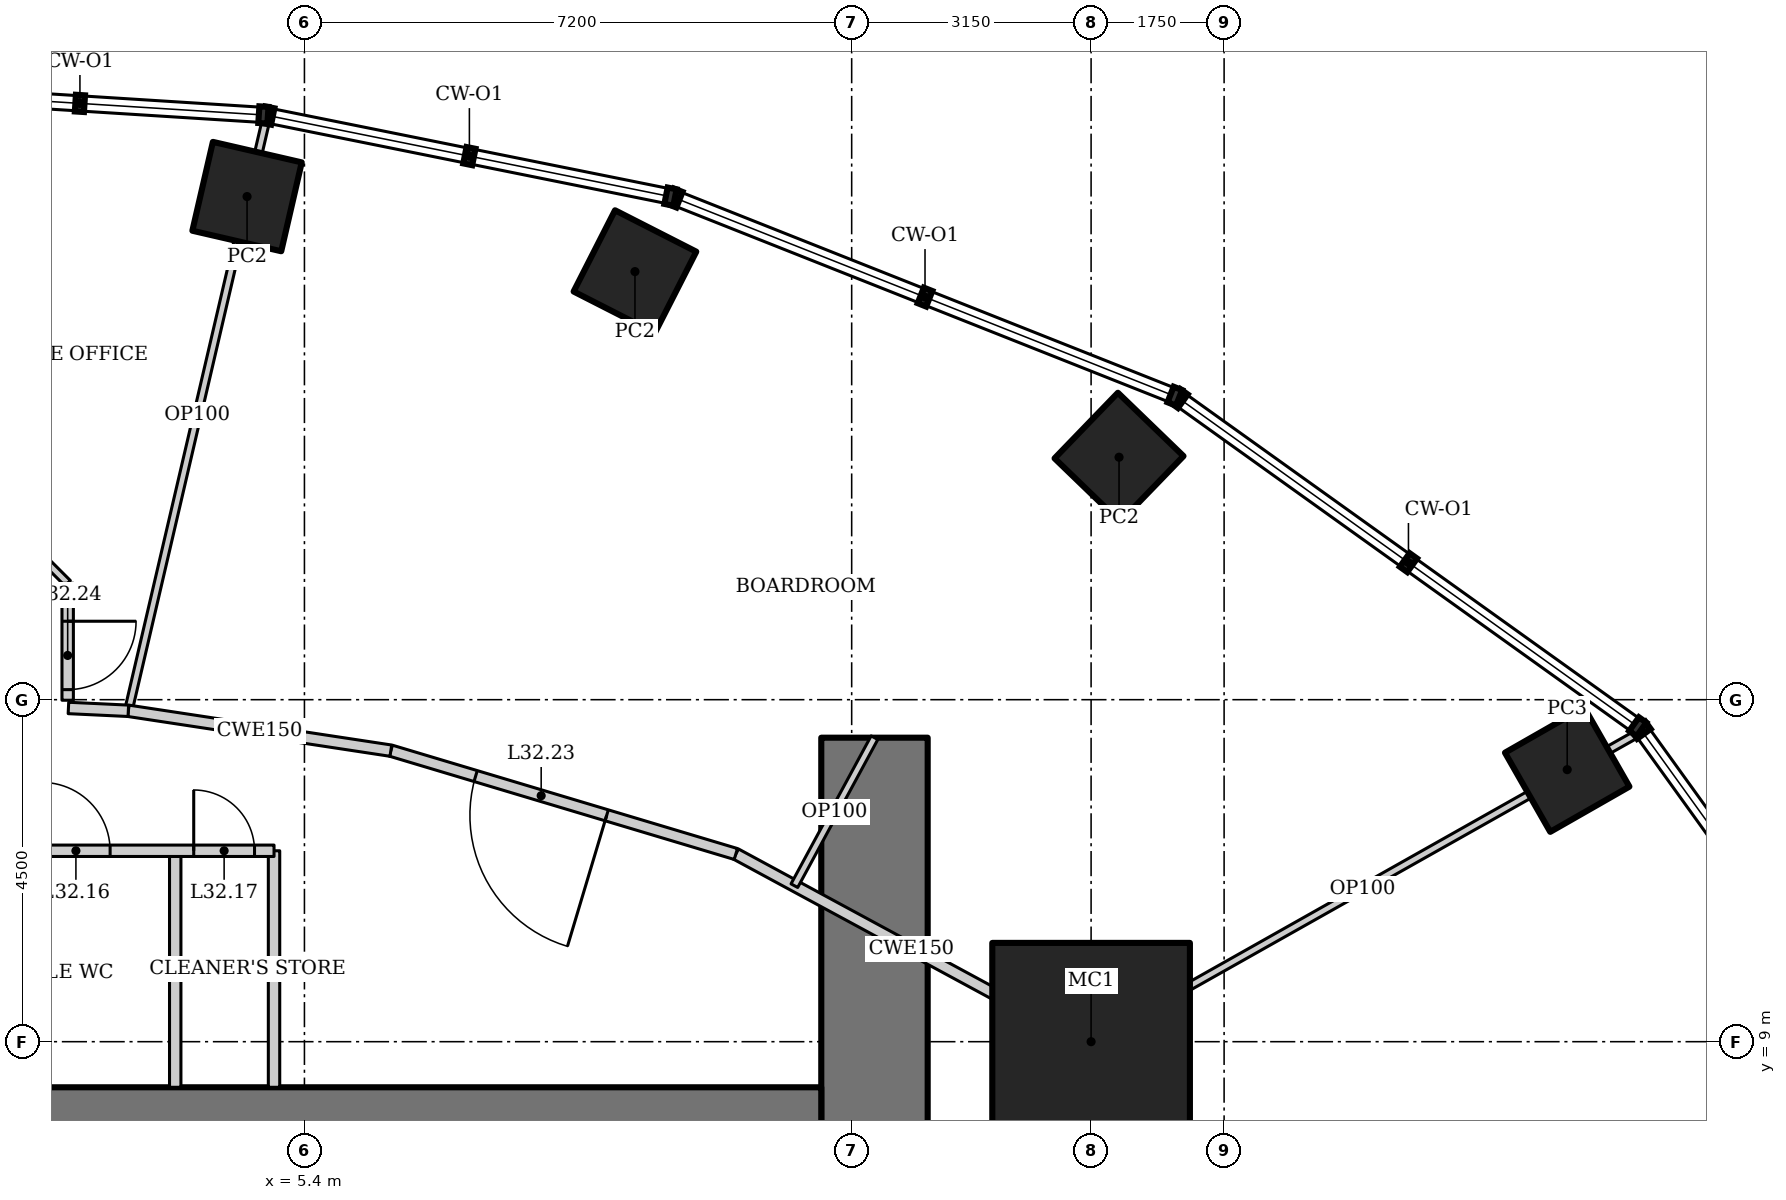
"""IFC4 building model, lengths in metres.
Left out: names, types, materials, properties, quantities, classifications, styles, units other than length and angle.
Written with IfcOpenShell. Run it as: python <this file> out.ifc"""

import sys

from ifc_helpers import new_model, si_unit, direction, frame, frame_2d, origin, origin_2d, place, context, subcontext, project, spatial, rectangle, hollow_rectangle, extrude, element, fill, save


model = new_model("IFC4")
c1 = context("Model", 3, precision=1e-05, world=origin(), true_north=direction((0.0, 1.0)))
c2 = subcontext(c1, "Body", "Model", "MODEL_VIEW")
j1 = project(units=[si_unit("LENGTHUNIT", "METRE"), si_unit("PLANEANGLEUNIT", "RADIAN")], contexts=[c1])
p1 = place(None, origin())
s1 = spatial("IfcSite", under=j1, at=p1, CompositionType="ELEMENT")
p2 = place(p1, origin())
s2 = spatial("IfcBuilding", under=s1, at=p2, CompositionType="ELEMENT")
p3 = place(p2, frame((0.0, 0.0, 138.4)))
s3 = spatial("IfcBuildingStorey", under=s2, at=p3, CompositionType="ELEMENT", Elevation=138.4)
p4 = place(p3, frame((15.75, 9.0, 0.0), z_axis=(0.0, 0.0, 1.0), x_axis=(1.0, 0.0, 0.0)))
e1 = element("IfcColumn", 1, at=p4, inside=s3, PredefinedType="COLUMN", context=c2, shape_type="SweptSolid", body=[
    extrude(hollow_rectangle(XDim=2.6, YDim=2.6, WallThickness=0.13, at=origin_2d()), origin(), (0.0, 0.0, 1.0), 4.2),
])
p5 = place(p3, frame((22.014, 12.579, 0.0), z_axis=(0.0, 0.0, 1.0), x_axis=(0.86824298017, 0.496139221777, 0.0)))
e2 = element("IfcColumn", 2, at=p5, inside=s3, PredefinedType="COLUMN", context=c2, shape_type="SweptSolid", body=[
    extrude(hollow_rectangle(XDim=1.2, YDim=1.2, WallThickness=0.12, at=origin_2d()), origin(), (0.0, 0.0, 1.0), 4.2),
])
for number, where, z_axis, x_axis in (
    (3, (16.118, 16.69, 0.0), (0.0, 0.0, 1.0), (0.695, 0.719, 0.0)),
    (4, (9.749, 19.133, 0.0), (0.0, 0.0, 1.0), (0.454, 0.891, 0.0)),
    (5, (4.645, 20.12, 0.0), (0.0, 0.0, 1.0), (0.225, 0.974, 0.0)),
):
    element("IfcColumn", number, at=place(p3, frame(where, z_axis=z_axis, x_axis=x_axis)), inside=s3, PredefinedType="COLUMN", context=c2, shape_type="SweptSolid", body=[
        extrude(hollow_rectangle(XDim=1.2, YDim=1.2, WallThickness=0.1, at=origin_2d()), origin(), (0.0, 0.0, 1.0), 4.2),
    ])
p6 = place(p3, frame((12.9, -13.0, 0.0), z_axis=(0.0, 0.0, 1.0), x_axis=(0.0, 1.0, 0.0)))
e6 = element("IfcWall", 6, at=p6, inside=s3, PredefinedType="SHEAR", context=c2, shape_type="SweptSolid", body=[
    extrude(rectangle(XDim=26.0, YDim=1.4, at=frame_2d((13.0, 0.0))), origin(), (0.0, 0.0, 1.0), 4.2),
])
p7 = place(p6, frame((12.1, 0.0, 0.0)))
e7 = element("IfcOpeningElement", 7, at=p7, cuts=e6, PredefinedType="OPENING", context=c2, shape_type="SweptSolid", body=[
    extrude(rectangle(XDim=1.8, YDim=2.1, at=frame_2d((0.9, 1.05))), frame((0.0, 0.71, 0.0), z_axis=(0.0, -1.0, 0.0), x_axis=(1.0, 0.0, 0.0)), (0.0, 0.0, 1.0), 1.42),
])
p8 = place(p3, frame((12.2, 7.6, 0.0), z_axis=(0.0, 0.0, 1.0), x_axis=(-1.0, 0.0, 0.0)))
e8 = element("IfcWall", 8, at=p8, inside=s3, PredefinedType="SHEAR", context=c2, shape_type="SweptSolid", body=[
    extrude(rectangle(XDim=24.4, YDim=1.6, at=frame_2d((12.2, 0.0))), origin(), (0.0, 0.0, 1.0), 4.2),
])
p9 = place(p3, frame((22.949, 13.059, 0.0), z_axis=(0.0, 0.0, 1.0), x_axis=(-0.871079462611, -0.491142107558, 0.0)))
e9 = element("IfcWall", 9, at=p9, inside=s3, PredefinedType="PARTITIONING", context=c2, shape_type="SweptSolid", body=[
    extrude(rectangle(XDim=8.327, YDim=0.1, at=frame_2d((4.164, 0.0))), origin(), (0.0, 0.0, 1.0), 3.451),
])
p10 = place(p3, frame((4.897, 21.135, 0.0), z_axis=(0.0, 0.0, 1.0), x_axis=(-0.227039313577, -0.973885593943, 0.0)))
e10 = element("IfcWall", 10, at=p10, inside=s3, PredefinedType="PARTITIONING", context=c2, shape_type="SweptSolid", body=[
    extrude(rectangle(XDim=7.99, YDim=0.1, at=frame_2d((3.995, 0.0))), origin(), (0.0, 0.0, 1.0), 3.293),
])
p11 = place(p3, frame((19.579, 4.882, 0.0), z_axis=(0.0, 0.0, 1.0), x_axis=(-0.688797257101, 0.72495402517, 0.0)))
e11 = element("IfcWall", 11, at=p11, inside=s3, PredefinedType="PARTITIONING", context=c2, shape_type="SweptSolid", body=[
    extrude(rectangle(XDim=5.638, YDim=0.15, at=frame_2d((2.819, 0.0))), origin(), (0.0, 0.0, 1.0), 4.05),
])
p12 = place(p11, frame((0.15, 0.0, 0.0)))
e12 = element("IfcOpeningElement", 12, at=p12, cuts=e11, PredefinedType="OPENING", context=c2, shape_type="SweptSolid", body=[
    extrude(rectangle(XDim=0.9, YDim=2.1, at=frame_2d((0.45, 1.05))), frame((0.0, 0.085, 0.0), z_axis=(0.0, -1.0, 0.0), x_axis=(1.0, 0.0, 0.0)), (0.0, 0.0, 1.0), 0.17),
])
p13 = place(p3, frame((15.696, 8.969, 0.0), z_axis=(0.0, 0.0, 1.0), x_axis=(-0.879436285334, 0.476016617397, 0.0)))
e13 = element("IfcWall", 13, at=p13, inside=s3, PredefinedType="PARTITIONING", context=c2, shape_type="SweptSolid", body=[
    extrude(rectangle(XDim=5.253, YDim=0.15, at=frame_2d((2.626, 0.0))), origin(), (0.0, 0.0, 1.0), 4.05),
])
p14 = place(p3, frame((11.076, 11.469, 0.0), z_axis=(0.0, 0.0, 1.0), x_axis=(-0.957933992798, 0.286988615527, 0.0)))
e14 = element("IfcWall", 14, at=p14, inside=s3, PredefinedType="PARTITIONING", context=c2, shape_type="SweptSolid", body=[
    extrude(rectangle(XDim=4.738, YDim=0.15, at=frame_2d((2.369, 0.0))), origin(), (0.0, 0.0, 1.0), 4.05),
])
p15 = place(p14, frame((1.774, 0.0, 0.0)))
e15 = element("IfcOpeningElement", 15, at=p15, cuts=e14, PredefinedType="OPENING", context=c2, shape_type="SweptSolid", body=[
    extrude(rectangle(XDim=1.8, YDim=2.1, at=frame_2d((0.9, 1.05))), frame((0.0, 0.085, 0.0), z_axis=(0.0, -1.0, 0.0), x_axis=(1.0, 0.0, 0.0)), (0.0, 0.0, 1.0), 0.17),
])
p16 = place(p3, frame((6.537, 12.829, 0.0), z_axis=(0.0, 0.0, 1.0), x_axis=(-0.988668719464, 0.150113833987, 0.0)))
e16 = element("IfcWall", 16, at=p16, inside=s3, PredefinedType="PARTITIONING", context=c2, shape_type="SweptSolid", body=[
    extrude(rectangle(XDim=3.493, YDim=0.15, at=frame_2d((1.747, 0.0))), origin(), (0.0, 0.0, 1.0), 4.05),
])
for number, where, z_axis, x_axis in (
    (17, (5.0, 8.4, 0.0), (0.0, 0.0, 1.0), (0.0, 1.0, 0.0)),
    (18, (3.7, 8.4, 0.0), (0.0, 0.0, 1.0), (0.0, 1.0, 0.0)),
):
    element("IfcWall", number, at=place(p3, frame(where, z_axis=z_axis, x_axis=x_axis)), inside=s3, PredefinedType="SOLIDWALL", context=c2, shape_type="SweptSolid", body=[
        extrude(rectangle(XDim=3.112, YDim=0.15, at=frame_2d((1.556, 0.0))), origin(), (0.0, 0.0, 1.0), 4.05),
    ])
p17 = place(p3, frame((12.9, 13.0, 0.0), z_axis=(0.0, 0.0, 1.0), x_axis=(-0.475998959765, -0.879445842734, 0.0)))
e19 = element("IfcWall", 19, at=p17, inside=s3, PredefinedType="PARTITIONING", context=c2, shape_type="SweptSolid", body=[
    extrude(rectangle(XDim=2.214, YDim=0.1, at=frame_2d((1.107, 0.0))), origin(), (0.0, 0.0, 1.0), 4.05),
])
p18 = place(p3, frame((3.083, 13.354, 0.0), z_axis=(0.0, 0.0, 1.0), x_axis=(-0.998878614804, 0.04734461836, 0.0)))
e20 = element("IfcWall", 20, at=p18, inside=s3, PredefinedType="PARTITIONING", context=c2, shape_type="SweptSolid", body=[
    extrude(rectangle(XDim=0.789, YDim=0.15, at=frame_2d((0.395, 0.0))), origin(), (0.0, 0.0, 1.0), 4.05),
])
p19 = place(p3, frame((1.844, 11.512, 0.0), z_axis=(0.0, 0.0, 1.0), x_axis=(1.0, 0.0, 0.0)))
e21 = element("IfcWall", 21, at=p19, inside=s3, PredefinedType="SOLIDWALL", context=c2, shape_type="SweptSolid", body=[
    extrude(rectangle(XDim=3.156, YDim=0.15, at=frame_2d((1.578, 0.0))), origin(), (0.0, 0.0, 1.0), 4.05),
])
p20 = place(p19, frame((0.1, 0.0, 0.0)))
e22 = element("IfcOpeningElement", 22, at=p20, cuts=e21, PredefinedType="OPENING", context=c2, shape_type="SweptSolid", body=[
    extrude(rectangle(XDim=0.9, YDim=2.1, at=frame_2d((0.45, 1.05))), frame((0.0, 0.085, 0.0), z_axis=(0.0, -1.0, 0.0), x_axis=(1.0, 0.0, 0.0)), (0.0, 0.0, 1.0), 0.17),
])
p21 = place(p19, frame((2.1, 0.0, 0.0)))
e23 = element("IfcOpeningElement", 23, at=p21, cuts=e21, PredefinedType="OPENING", context=c2, shape_type="SweptSolid", body=[
    extrude(rectangle(XDim=0.8, YDim=2.1, at=frame_2d((0.4, 1.05))), frame((0.0, 0.085, 0.0), z_axis=(0.0, -1.0, 0.0), x_axis=(1.0, 0.0, 0.0)), (0.0, 0.0, 1.0), 0.17),
])
p22 = place(p3, frame((1.532, 15.785, 0.0), z_axis=(0.0, 0.0, 1.0), x_axis=(0.707106781187, -0.707106781187, 0.0)))
e24 = element("IfcWall", 24, at=p22, inside=s3, PredefinedType="PARTITIONING", context=c2, shape_type="SweptSolid", body=[
    extrude(rectangle(XDim=1.064, YDim=0.1, at=frame_2d((0.532, 0.0))), origin(), (0.0, 0.0, 1.0), 4.05),
])
p23 = place(p3, frame((2.285, 15.032, 0.0), z_axis=(0.0, 0.0, 1.0), x_axis=(0.0, -1.0, 0.0)))
e25 = element("IfcWall", 25, at=p23, inside=s3, PredefinedType="PARTITIONING", context=c2, shape_type="SweptSolid", body=[
    extrude(rectangle(XDim=1.54, YDim=0.15, at=frame_2d((0.77, 0.0))), origin(), (0.0, 0.0, 1.0), 4.05),
])
p24 = place(p23, frame((0.5, 0.0, 0.0)))
e26 = element("IfcOpeningElement", 26, at=p24, cuts=e25, PredefinedType="OPENING", context=c2, shape_type="SweptSolid", body=[
    extrude(rectangle(XDim=0.9, YDim=2.1, at=frame_2d((0.45, 1.05))), frame((0.0, 0.085, 0.0), z_axis=(0.0, -1.0, 0.0), x_axis=(1.0, 0.0, 0.0)), (0.0, 0.0, 1.0), 0.17),
])
p25 = place(p20, origin())
e27 = element("IfcDoor", 27, at=p25, inside=s3, OperationType="SINGLE_SWING_LEFT", PredefinedType="DOOR", context=c2, shape_type="SweptSolid", body=[
    extrude(rectangle(XDim=0.9, YDim=2.1, at=frame_2d((0.45, 1.05))), frame((0.0, 0.025, 0.0), z_axis=(0.0, -1.0, 0.0), x_axis=(1.0, 0.0, 0.0)), (0.0, 0.0, 1.0), 0.05),
])
fill(e22, e27)
p26 = place(p21, origin())
e28 = element("IfcDoor", 28, at=p26, inside=s3, OperationType="SINGLE_SWING_LEFT", PredefinedType="DOOR", context=c2, shape_type="SweptSolid", body=[
    extrude(rectangle(XDim=0.8, YDim=2.1, at=frame_2d((0.4, 1.05))), frame((0.0, 0.025, 0.0), z_axis=(0.0, -1.0, 0.0), x_axis=(1.0, 0.0, 0.0)), (0.0, 0.0, 1.0), 0.05),
])
fill(e23, e28)
p27 = place(p15, origin())
e29 = element("IfcDoor", 29, at=p27, inside=s3, OperationType="DOUBLE_DOOR_DOUBLE_SWING", PredefinedType="DOOR", context=c2, shape_type="SweptSolid", body=[
    extrude(rectangle(XDim=1.8, YDim=2.1, at=frame_2d((0.9, 1.05))), frame((0.0, 0.025, 0.0), z_axis=(0.0, -1.0, 0.0), x_axis=(1.0, 0.0, 0.0)), (0.0, 0.0, 1.0), 0.05),
])
fill(e15, e29)
p28 = place(p24, origin())
e30 = element("IfcDoor", 30, at=p28, inside=s3, OperationType="SINGLE_SWING_LEFT", PredefinedType="DOOR", context=c2, shape_type="SweptSolid", body=[
    extrude(rectangle(XDim=0.9, YDim=2.1, at=frame_2d((0.45, 1.05))), frame((0.0, 0.025, 0.0), z_axis=(0.0, -1.0, 0.0), x_axis=(1.0, 0.0, 0.0)), (0.0, 0.0, 1.0), 0.05),
])
fill(e26, e30)
save(model, sys.argv[1])
